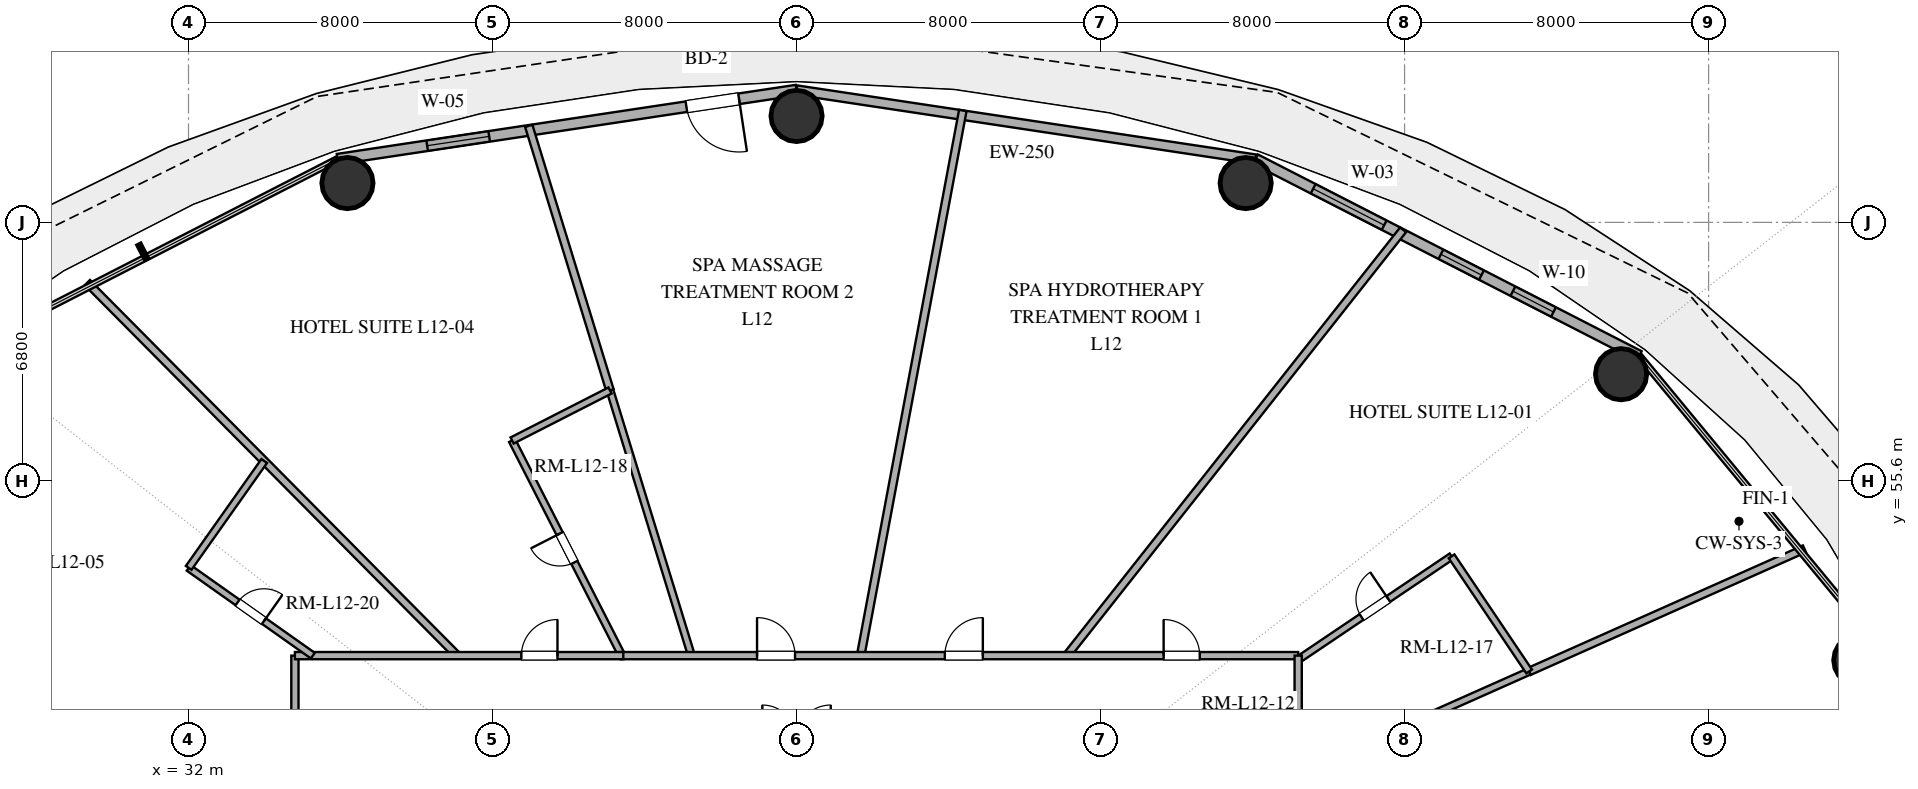
"""IFC4 building model, lengths in metres.
Left out: names, types, materials, properties, quantities, classifications, styles, units other than length and angle.
Written with IfcOpenShell. Run it as: python <this file> out.ifc"""

import sys

from ifc_helpers import new_model, si_unit, direction, frame, frame_2d, origin, origin_2d, place, context, subcontext, project, spatial, rectangle, hollow_circle, extrude, element, fill, save


model = new_model("IFC4")
c1 = context("Model", 3, precision=1e-05, world=origin(), true_north=direction((0.0, 1.0)))
c2 = subcontext(c1, "Body", "Model", "MODEL_VIEW")
j1 = project(units=[si_unit("LENGTHUNIT", "METRE"), si_unit("PLANEANGLEUNIT", "RADIAN")], contexts=[c1])
p1 = place(None, origin())
s1 = spatial("IfcSite", under=j1, at=p1, CompositionType="ELEMENT")
p2 = place(p1, origin())
s2 = spatial("IfcBuilding", under=s1, at=p2, CompositionType="ELEMENT")
p3 = place(p2, frame((0.0, 0.0, 53.4)))
s3 = spatial("IfcBuildingStorey", under=s2, at=p3, CompositionType="ELEMENT", Elevation=53.4)
for number, where, z_axis, x_axis in (
    (1, (75.966, 50.878, 0.0), (0.0, 0.0, 1.0), (1.0, 0.0, 0.0)),
    (2, (69.697, 58.405, 0.0), (0.0, 0.0, 1.0), (1.0, 0.0, 0.0)),
    (3, (59.818, 63.434, 0.0), (0.0, 0.0, 1.0), (1.0, 0.0, 0.0)),
    (4, (48.0, 65.2, 0.0), (0.0, 0.0, 1.0), (1.0, 0.0, 0.0)),
    (5, (36.182, 63.434, 0.0), (0.0, 0.0, 1.0), (1.0, 0.0, 0.0)),
):
    element("IfcColumn", number, at=place(p3, frame(where, z_axis=z_axis, x_axis=x_axis)), inside=s3, PredefinedType="COLUMN", context=c2, shape_type="SweptSolid", body=[
        extrude(hollow_circle(Radius=0.675, WallThickness=0.036, at=origin_2d()), origin(), (0.0, 0.0, 1.0), 3.38),
    ])
p4 = place(p3, frame((70.174, 58.886, 0.0), z_axis=(0.0, 0.0, 1.0), x_axis=(-0.889853976658, 0.456245438581, 0.0)))
e6 = element("IfcWall", 6, at=p4, inside=s3, PredefinedType="SOLIDWALL", context=c2, shape_type="SweptSolid", body=[
    extrude(rectangle(XDim=11.346, YDim=0.28, at=frame_2d((5.673, 0.0))), origin(), (0.0, 0.0, 1.0), 3.38),
])
p5 = place(p4, frame((2.535, 0.0, 0.85)))
e7 = element("IfcOpeningElement", 7, at=p5, cuts=e6, PredefinedType="OPENING", context=c2, shape_type="SweptSolid", body=[
    extrude(rectangle(XDim=1.2, YDim=1.6, at=frame_2d((0.6, 0.8))), frame((0.0, 0.15, 0.0), z_axis=(0.0, -1.0, 0.0), x_axis=(1.0, 0.0, 0.0)), (0.0, 0.0, 1.0), 0.3),
])
p6 = place(p4, frame((4.664, 0.0, 0.85)))
e8 = element("IfcOpeningElement", 8, at=p6, cuts=e6, PredefinedType="OPENING", context=c2, shape_type="SweptSolid", body=[
    extrude(rectangle(XDim=1.2, YDim=1.6, at=frame_2d((0.6, 0.8))), frame((0.0, 0.15, 0.0), z_axis=(0.0, -1.0, 0.0), x_axis=(1.0, 0.0, 0.0)), (0.0, 0.0, 1.0), 0.3),
])
p7 = place(p4, frame((7.542, 0.0, 0.85)))
e9 = element("IfcOpeningElement", 9, at=p7, cuts=e6, PredefinedType="OPENING", context=c2, shape_type="SweptSolid", body=[
    extrude(rectangle(XDim=2.1, YDim=2.2, at=frame_2d((1.05, 1.1))), frame((0.0, 0.15, 0.0), z_axis=(0.0, -1.0, 0.0), x_axis=(1.0, 0.0, 0.0)), (0.0, 0.0, 1.0), 0.3),
])
p8 = place(p3, frame((60.078, 64.062, 0.0), z_axis=(0.0, 0.0, 1.0), x_axis=(-0.988864835849, 0.148816452121, 0.0)))
e10 = element("IfcWall", 10, at=p8, inside=s3, PredefinedType="SOLIDWALL", context=c2, shape_type="SweptSolid", body=[
    extrude(rectangle(XDim=12.214, YDim=0.25, at=frame_2d((6.107, 0.0))), origin(), (0.0, 0.0, 1.0), 3.38),
])
p9 = place(p3, frame((48.0, 65.88, 0.0), z_axis=(0.0, 0.0, 1.0), x_axis=(-0.988864835849, -0.148816452121, 0.0)))
e11 = element("IfcWall", 11, at=p9, inside=s3, PredefinedType="SOLIDWALL", context=c2, shape_type="SweptSolid", body=[
    extrude(rectangle(XDim=12.214, YDim=0.28, at=frame_2d((6.107, 0.0))), origin(), (0.0, 0.0, 1.0), 3.38),
])
p10 = place(p9, frame((1.531, 0.0, 0.0)))
e12 = element("IfcOpeningElement", 12, at=p10, cuts=e11, PredefinedType="OPENING", context=c2, shape_type="SweptSolid", body=[
    extrude(rectangle(XDim=1.4, YDim=2.2, at=frame_2d((0.7, 1.1))), frame((0.0, 0.15, 0.0), z_axis=(0.0, -1.0, 0.0), x_axis=(1.0, 0.0, 0.0)), (0.0, 0.0, 1.0), 0.3),
])
p11 = place(p9, frame((8.179, 0.0, 0.85)))
e13 = element("IfcOpeningElement", 13, at=p11, cuts=e11, PredefinedType="OPENING", context=c2, shape_type="SweptSolid", body=[
    extrude(rectangle(XDim=1.65, YDim=2.0, at=frame_2d((0.825, 1.0))), frame((0.0, 0.15, 0.0), z_axis=(0.0, -1.0, 0.0), x_axis=(1.0, 0.0, 0.0)), (0.0, 0.0, 1.0), 0.3),
])
p12 = place(p3, frame((52.375, 65.343, 0.0), z_axis=(0.0, 0.0, 1.0), x_axis=(-0.184219844734, -0.982885063884, 0.0)))
e14 = element("IfcWall", 14, at=p12, inside=s3, PredefinedType="PARTITIONING", context=c2, shape_type="SweptSolid", body=[
    extrude(rectangle(XDim=14.593, YDim=0.2, at=frame_2d((7.296, 0.0))), origin(), (0.0, 0.0, 1.0), 2.74),
])
p13 = place(p3, frame((63.96, 62.204, 0.0), z_axis=(0.0, 0.0, 1.0), x_axis=(-0.619889304847, -0.784689269543, 0.0)))
e15 = element("IfcWall", 15, at=p13, inside=s3, PredefinedType="PARTITIONING", context=c2, shape_type="SweptSolid", body=[
    extrude(rectangle(XDim=14.278, YDim=0.2, at=frame_2d((7.139, 0.0))), origin(), (0.0, 0.0, 1.0), 2.74),
])
p14 = place(p3, frame((34.8, 46.172, 0.0), z_axis=(0.0, 0.0, 1.0), x_axis=(-0.953511676516, 0.301356073023, 0.0)))
e16 = element("IfcWall", 16, at=p14, inside=s3, PredefinedType="PARTITIONING", context=c2, shape_type="SweptSolid", body=[
    extrude(rectangle(XDim=16.275, YDim=0.2, at=frame_2d((8.137, 0.0))), origin(), (0.0, 0.0, 1.0), 2.74),
])
p15 = place(p3, frame((74.523, 53.809, 0.0), z_axis=(0.0, 0.0, 1.0), x_axis=(-0.913542208968, -0.40674393964, 0.0)))
e17 = element("IfcWall", 17, at=p15, inside=s3, PredefinedType="PARTITIONING", context=c2, shape_type="SweptSolid", body=[
    extrude(rectangle(XDim=7.93, YDim=0.2, at=frame_2d((3.965, 0.0))), origin(), (0.0, 0.0, 1.0), 2.74),
])
p16 = place(p3, frame((43.092, 57.976, 0.0), z_axis=(0.0, 0.0, 1.0), x_axis=(0.293648581073, -0.95591344317, 0.0)))
e18 = element("IfcWall", 18, at=p16, inside=s3, PredefinedType="PLUMBINGWALL", context=c2, shape_type="SweptSolid", body=[
    extrude(rectangle(XDim=7.298, YDim=0.18, at=frame_2d((3.649, 0.0))), origin(), (0.0, 0.0, 1.0), 2.74),
])
p17 = place(p3, frame((40.953, 64.939, 0.0), z_axis=(0.0, 0.0, 1.0), x_axis=(0.293635973675, -0.955917315966, 0.0)))
e19 = element("IfcWall", 19, at=p17, inside=s3, PredefinedType="PARTITIONING", context=c2, shape_type="SweptSolid", body=[
    extrude(rectangle(XDim=7.284, YDim=0.2, at=frame_2d((3.642, 0.0))), origin(), (0.0, 0.0, 1.0), 2.74),
])
p18 = place(p3, frame((39.072, 51.0, 0.0), z_axis=(0.0, 0.0, 1.0), x_axis=(-0.704257683765, 0.70994444491, 0.0)))
e20 = element("IfcWall", 20, at=p18, inside=s3, PredefinedType="PARTITIONING", context=c2, shape_type="SweptSolid", body=[
    extrude(rectangle(XDim=13.824, YDim=0.2, at=frame_2d((6.912, 0.0))), origin(), (0.0, 0.0, 1.0), 2.74),
])
p19 = place(p3, frame((67.278, 50.583, 0.0), z_axis=(0.0, 0.0, 1.0), x_axis=(-0.913551093465, -0.406723984575, 0.0)))
e21 = element("IfcWall", 21, at=p19, inside=s3, PredefinedType="PLUMBINGWALL", context=c2, shape_type="SweptSolid", body=[
    extrude(rectangle(XDim=6.653, YDim=0.18, at=frame_2d((3.327, 0.0))), origin(), (0.0, 0.0, 1.0), 2.74),
])
p20 = place(p3, frame((43.405, 51.0, 0.0), z_axis=(0.0, 0.0, 1.0), x_axis=(-0.454680565764, 0.890654581259, 0.0)))
e22 = element("IfcWall", 22, at=p20, inside=s3, PredefinedType="PLUMBINGWALL", context=c2, shape_type="SweptSolid", body=[
    extrude(rectangle(XDim=6.356, YDim=0.18, at=frame_2d((3.178, 0.0))), origin(), (0.0, 0.0, 1.0), 2.74),
])
p21 = place(p20, frame((2.753, 0.0, 0.0)))
e23 = element("IfcOpeningElement", 23, at=p21, cuts=e22, PredefinedType="OPENING", context=c2, shape_type="SweptSolid", body=[
    extrude(rectangle(XDim=0.85, YDim=2.1, at=frame_2d((0.425, 1.05))), frame((0.0, 0.1, 0.0), z_axis=(0.0, -1.0, 0.0), x_axis=(1.0, 0.0, 0.0)), (0.0, 0.0, 1.0), 0.2),
])
p22 = place(p3, frame((43.369, 51.0, 0.0), z_axis=(0.0, 0.0, 1.0), x_axis=(1.0, 0.0, 0.0)))
e24 = element("IfcWall", 24, at=p22, inside=s3, PredefinedType="PARTITIONING", context=c2, shape_type="SweptSolid", body=[
    extrude(rectangle(XDim=17.831, YDim=0.19, at=frame_2d((8.916, 0.0))), origin(), (0.0, 0.0, 1.0), 2.74),
])
p23 = place(p22, frame((14.29, 0.0, 0.0)))
e25 = element("IfcOpeningElement", 25, at=p23, cuts=e24, PredefinedType="OPENING", context=c2, shape_type="SweptSolid", body=[
    extrude(rectangle(XDim=0.95, YDim=2.15, at=frame_2d((0.475, 1.075))), frame((0.0, 0.105, 0.0), z_axis=(0.0, -1.0, 0.0), x_axis=(1.0, 0.0, 0.0)), (0.0, 0.0, 1.0), 0.21),
])
p24 = place(p22, frame((8.533, 0.0, 0.0)))
e26 = element("IfcOpeningElement", 26, at=p24, cuts=e24, PredefinedType="OPENING", context=c2, shape_type="SweptSolid", body=[
    extrude(rectangle(XDim=1.0, YDim=2.2, at=frame_2d((0.5, 1.1))), frame((0.0, 0.105, 0.0), z_axis=(0.0, -1.0, 0.0), x_axis=(1.0, 0.0, 0.0)), (0.0, 0.0, 1.0), 0.21),
])
p25 = place(p22, frame((3.591, 0.0, 0.0)))
e27 = element("IfcOpeningElement", 27, at=p25, cuts=e24, PredefinedType="OPENING", context=c2, shape_type="SweptSolid", body=[
    extrude(rectangle(XDim=1.0, YDim=2.2, at=frame_2d((0.5, 1.1))), frame((0.0, 0.105, 0.0), z_axis=(0.0, -1.0, 0.0), x_axis=(1.0, 0.0, 0.0)), (0.0, 0.0, 1.0), 0.21),
])
p26 = place(p3, frame((61.2, 50.893, 0.0), z_axis=(0.0, 0.0, 1.0), x_axis=(0.829362933151, 0.558710233587, 0.0)))
e28 = element("IfcWall", 28, at=p26, inside=s3, PredefinedType="PLUMBINGWALL", context=c2, shape_type="SweptSolid", body=[
    extrude(rectangle(XDim=4.867, YDim=0.18, at=frame_2d((2.434, 0.0))), origin(), (0.0, 0.0, 1.0), 2.74),
])
p27 = place(p26, frame((2.009, 0.0, 0.0)))
e29 = element("IfcOpeningElement", 29, at=p27, cuts=e28, PredefinedType="OPENING", context=c2, shape_type="SweptSolid", body=[
    extrude(rectangle(XDim=0.85, YDim=2.1, at=frame_2d((0.425, 1.05))), frame((0.0, 0.1, 0.0), z_axis=(0.0, -1.0, 0.0), x_axis=(1.0, 0.0, 0.0)), (0.0, 0.0, 1.0), 0.2),
])
p28 = place(p3, frame((34.8, 43.722, 0.0), z_axis=(0.0, 0.0, 1.0), x_axis=(0.0, 1.0, 0.0)))
e30 = element("IfcWall", 30, at=p28, inside=s3, PredefinedType="PARTITIONING", context=c2, shape_type="SweptSolid", body=[
    extrude(rectangle(XDim=7.278, YDim=0.19, at=frame_2d((3.639, 0.0))), origin(), (0.0, 0.0, 1.0), 2.74),
])
p29 = place(p28, frame((4.372, 0.0, 0.0)))
e31 = element("IfcOpeningElement", 31, at=p29, cuts=e30, PredefinedType="OPENING", context=c2, shape_type="SweptSolid", body=[
    extrude(rectangle(XDim=0.95, YDim=2.15, at=frame_2d((0.475, 1.075))), frame((0.0, 0.105, 0.0), z_axis=(0.0, -1.0, 0.0), x_axis=(1.0, 0.0, 0.0)), (0.0, 0.0, 1.0), 0.21),
])
p30 = place(p3, frame((61.2, 51.0, 0.0), z_axis=(0.0, 0.0, 1.0), x_axis=(0.0, -1.0, 0.0)))
e32 = element("IfcWall", 32, at=p30, inside=s3, PredefinedType="PARTITIONING", context=c2, shape_type="SweptSolid", body=[
    extrude(rectangle(XDim=9.852, YDim=0.19, at=frame_2d((4.926, 0.0))), origin(), (0.0, 0.0, 1.0), 2.74),
])
p31 = place(p30, frame((4.859, 0.0, 0.0)))
e33 = element("IfcOpeningElement", 33, at=p31, cuts=e32, PredefinedType="OPENING", context=c2, shape_type="SweptSolid", body=[
    extrude(rectangle(XDim=0.95, YDim=2.15, at=frame_2d((0.475, 1.075))), frame((0.0, 0.105, 0.0), z_axis=(0.0, -1.0, 0.0), x_axis=(1.0, 0.0, 0.0)), (0.0, 0.0, 1.0), 0.21),
])
p32 = place(p3, frame((34.8, 51.0, 0.0), z_axis=(0.0, 0.0, 1.0), x_axis=(1.0, 0.0, 0.0)))
e34 = element("IfcWall", 34, at=p32, inside=s3, PredefinedType="PARTITIONING", context=c2, shape_type="SweptSolid", body=[
    extrude(rectangle(XDim=8.641, YDim=0.19, at=frame_2d((4.32, 0.0))), origin(), (0.0, 0.0, 1.0), 2.74),
])
p33 = place(p32, frame((5.959, 0.0, 0.0)))
e35 = element("IfcOpeningElement", 35, at=p33, cuts=e34, PredefinedType="OPENING", context=c2, shape_type="SweptSolid", body=[
    extrude(rectangle(XDim=0.95, YDim=2.15, at=frame_2d((0.475, 1.075))), frame((0.0, 0.105, 0.0), z_axis=(0.0, -1.0, 0.0), x_axis=(1.0, 0.0, 0.0)), (0.0, 0.0, 1.0), 0.21),
])
p34 = place(p3, frame((32.005, 53.309, 0.0), z_axis=(0.0, 0.0, 1.0), x_axis=(0.816524416543, -0.577310901672, 0.0)))
e36 = element("IfcWall", 36, at=p34, inside=s3, PredefinedType="PLUMBINGWALL", context=c2, shape_type="SweptSolid", body=[
    extrude(rectangle(XDim=4.0, YDim=0.18, at=frame_2d((2.0, 0.0))), origin(), (0.0, 0.0, 1.0), 2.74),
])
p35 = place(p34, frame((1.575, 0.0, 0.0)))
e37 = element("IfcOpeningElement", 37, at=p35, cuts=e36, PredefinedType="OPENING", context=c2, shape_type="SweptSolid", body=[
    extrude(rectangle(XDim=0.85, YDim=2.1, at=frame_2d((0.425, 1.05))), frame((0.0, 0.1, 0.0), z_axis=(0.0, -1.0, 0.0), x_axis=(1.0, 0.0, 0.0)), (0.0, 0.0, 1.0), 0.2),
])
p36 = place(p3, frame((65.237, 53.613, 0.0), z_axis=(0.0, 0.0, 1.0), x_axis=(0.558749555988, -0.829336441791, 0.0)))
e38 = element("IfcWall", 38, at=p36, inside=s3, PredefinedType="PLUMBINGWALL", context=c2, shape_type="SweptSolid", body=[
    extrude(rectangle(XDim=3.653, YDim=0.18, at=frame_2d((1.827, 0.0))), origin(), (0.0, 0.0, 1.0), 2.74),
])
p37 = place(p3, frame((33.993, 56.121, 0.0), z_axis=(0.0, 0.0, 1.0), x_axis=(-0.57730102799, -0.816531397487, 0.0)))
e39 = element("IfcWall", 39, at=p37, inside=s3, PredefinedType="PLUMBINGWALL", context=c2, shape_type="SweptSolid", body=[
    extrude(rectangle(XDim=3.443, YDim=0.18, at=frame_2d((1.722, 0.0))), origin(), (0.0, 0.0, 1.0), 2.74),
])
p38 = place(p3, frame((40.515, 56.661, 0.0), z_axis=(0.0, 0.0, 1.0), x_axis=(0.890666340124, 0.454657531083, 0.0)))
e40 = element("IfcWall", 40, at=p38, inside=s3, PredefinedType="PLUMBINGWALL", context=c2, shape_type="SweptSolid", body=[
    extrude(rectangle(XDim=2.893, YDim=0.18, at=frame_2d((1.447, 0.0))), origin(), (0.0, 0.0, 1.0), 2.74),
])
p39 = place(p5, origin())
e41 = element("IfcWindow", 41, at=p39, inside=s3, PartitioningType="SINGLE_PANEL", PredefinedType="WINDOW", context=c2, shape_type="SweptSolid", body=[
    extrude(rectangle(XDim=1.2, YDim=1.6, at=frame_2d((0.6, 0.8))), frame((0.0, 0.03, 0.0), z_axis=(0.0, -1.0, 0.0), x_axis=(1.0, 0.0, 0.0)), (0.0, 0.0, 1.0), 0.06),
])
fill(e7, e41)
p40 = place(p6, origin())
e42 = element("IfcWindow", 42, at=p40, inside=s3, PartitioningType="SINGLE_PANEL", PredefinedType="WINDOW", context=c2, shape_type="SweptSolid", body=[
    extrude(rectangle(XDim=1.2, YDim=1.6, at=frame_2d((0.6, 0.8))), frame((0.0, 0.03, 0.0), z_axis=(0.0, -1.0, 0.0), x_axis=(1.0, 0.0, 0.0)), (0.0, 0.0, 1.0), 0.06),
])
fill(e8, e42)
p41 = place(p7, origin())
e43 = element("IfcWindow", 43, at=p41, inside=s3, PartitioningType="SINGLE_PANEL", PredefinedType="WINDOW", context=c2, shape_type="SweptSolid", body=[
    extrude(rectangle(XDim=2.1, YDim=2.2, at=frame_2d((1.05, 1.1))), frame((0.0, 0.03, 0.0), z_axis=(0.0, -1.0, 0.0), x_axis=(1.0, 0.0, 0.0)), (0.0, 0.0, 1.0), 0.06),
])
fill(e9, e43)
p42 = place(p10, origin())
e44 = element("IfcDoor", 44, at=p42, inside=s3, OperationType="SINGLE_SWING_LEFT", PredefinedType="DOOR", context=c2, shape_type="SweptSolid", body=[
    extrude(rectangle(XDim=1.4, YDim=2.2, at=frame_2d((0.7, 1.1))), frame((0.0, 0.025, 0.0), z_axis=(0.0, -1.0, 0.0), x_axis=(1.0, 0.0, 0.0)), (0.0, 0.0, 1.0), 0.05),
])
fill(e12, e44)
p43 = place(p11, origin())
e45 = element("IfcWindow", 45, at=p43, inside=s3, PartitioningType="SINGLE_PANEL", PredefinedType="WINDOW", context=c2, shape_type="SweptSolid", body=[
    extrude(rectangle(XDim=1.65, YDim=2.0, at=frame_2d((0.825, 1.0))), frame((0.0, 0.03, 0.0), z_axis=(0.0, -1.0, 0.0), x_axis=(1.0, 0.0, 0.0)), (0.0, 0.0, 1.0), 0.06),
])
fill(e13, e45)
p44 = place(p21, origin())
e46 = element("IfcDoor", 46, at=p44, inside=s3, OperationType="SINGLE_SWING_RIGHT", PredefinedType="DOOR", context=c2, shape_type="SweptSolid", body=[
    extrude(rectangle(XDim=0.85, YDim=2.1, at=frame_2d((0.425, 1.05))), frame((0.0, 0.025, 0.0), z_axis=(0.0, -1.0, 0.0), x_axis=(1.0, 0.0, 0.0)), (0.0, 0.0, 1.0), 0.05),
])
fill(e23, e46)
p45 = place(p23, origin())
e47 = element("IfcDoor", 47, at=p45, inside=s3, OperationType="SINGLE_SWING_LEFT", PredefinedType="DOOR", context=c2, shape_type="SweptSolid", body=[
    extrude(rectangle(XDim=0.95, YDim=2.15, at=frame_2d((0.475, 1.075))), frame((0.0, 0.025, 0.0), z_axis=(0.0, -1.0, 0.0), x_axis=(1.0, 0.0, 0.0)), (0.0, 0.0, 1.0), 0.05),
])
fill(e25, e47)
p46 = place(p24, origin())
e48 = element("IfcDoor", 48, at=p46, inside=s3, OperationType="SINGLE_SWING_RIGHT", PredefinedType="DOOR", context=c2, shape_type="SweptSolid", body=[
    extrude(rectangle(XDim=1.0, YDim=2.2, at=frame_2d((0.5, 1.1))), frame((0.0, 0.025, 0.0), z_axis=(0.0, -1.0, 0.0), x_axis=(1.0, 0.0, 0.0)), (0.0, 0.0, 1.0), 0.05),
])
fill(e26, e48)
p47 = place(p25, origin())
e49 = element("IfcDoor", 49, at=p47, inside=s3, OperationType="SINGLE_SWING_LEFT", PredefinedType="DOOR", context=c2, shape_type="SweptSolid", body=[
    extrude(rectangle(XDim=1.0, YDim=2.2, at=frame_2d((0.5, 1.1))), frame((0.0, 0.025, 0.0), z_axis=(0.0, -1.0, 0.0), x_axis=(1.0, 0.0, 0.0)), (0.0, 0.0, 1.0), 0.05),
])
fill(e27, e49)
p48 = place(p27, origin())
e50 = element("IfcDoor", 50, at=p48, inside=s3, OperationType="SINGLE_SWING_RIGHT", PredefinedType="DOOR", context=c2, shape_type="SweptSolid", body=[
    extrude(rectangle(XDim=0.85, YDim=2.1, at=frame_2d((0.425, 1.05))), frame((0.0, 0.025, 0.0), z_axis=(0.0, -1.0, 0.0), x_axis=(1.0, 0.0, 0.0)), (0.0, 0.0, 1.0), 0.05),
])
fill(e29, e50)
p49 = place(p33, origin())
e51 = element("IfcDoor", 51, at=p49, inside=s3, OperationType="SINGLE_SWING_RIGHT", PredefinedType="DOOR", context=c2, shape_type="SweptSolid", body=[
    extrude(rectangle(XDim=0.95, YDim=2.15, at=frame_2d((0.475, 1.075))), frame((0.0, 0.025, 0.0), z_axis=(0.0, -1.0, 0.0), x_axis=(1.0, 0.0, 0.0)), (0.0, 0.0, 1.0), 0.05),
])
fill(e35, e51)
p50 = place(p35, origin())
e52 = element("IfcDoor", 52, at=p50, inside=s3, OperationType="SINGLE_SWING_RIGHT", PredefinedType="DOOR", context=c2, shape_type="SweptSolid", body=[
    extrude(rectangle(XDim=0.85, YDim=2.1, at=frame_2d((0.425, 1.05))), frame((0.0, 0.025, 0.0), z_axis=(0.0, -1.0, 0.0), x_axis=(1.0, 0.0, 0.0)), (0.0, 0.0, 1.0), 0.05),
])
fill(e37, e52)
save(model, sys.argv[1])
